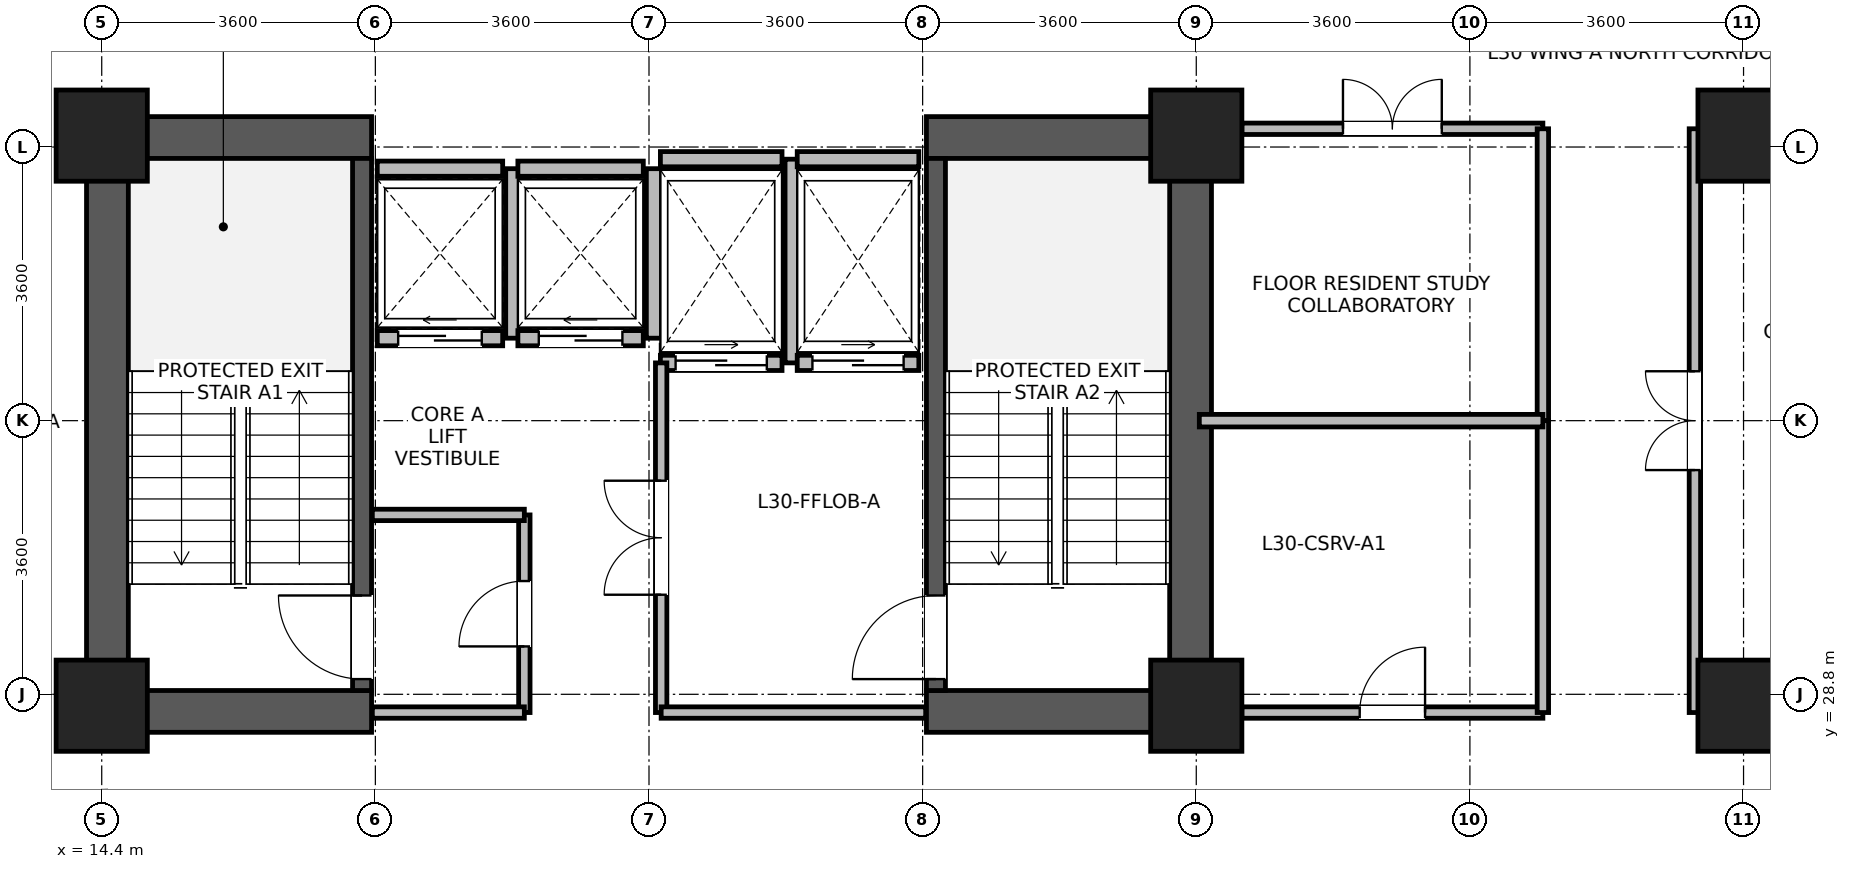
"""IFC4 building model, lengths in metres.
Left out: names, types, materials, properties, quantities, classifications, styles, units other than length and angle.
Written with IfcOpenShell. Run it as: python <this file> out.ifc"""

import sys

from ifc_helpers import new_model, si_unit, direction, frame, frame_2d, origin, origin_2d, place, context, subcontext, project, spatial, rectangle, extrude, source, transform, mapped, element, fill, save


model = new_model("IFC4")
c1 = context("Model", 3, precision=1e-05, world=origin(), true_north=direction((0.0, 1.0)))
c2 = subcontext(c1, "Body", "Model", "MODEL_VIEW")
j1 = project(units=[si_unit("LENGTHUNIT", "METRE"), si_unit("PLANEANGLEUNIT", "RADIAN")], contexts=[c1])
p1 = place(None, origin())
s1 = spatial("IfcSite", under=j1, at=p1, CompositionType="ELEMENT")
p2 = place(p1, origin())
s2 = spatial("IfcBuilding", under=s1, at=p2, CompositionType="ELEMENT")
p3 = place(p2, frame((0.0, 0.0, 119.3)))
s3 = spatial("IfcBuildingStorey", under=s2, at=p3, CompositionType="ELEMENT", Elevation=119.3)
for number, where, z_axis, x_axis in (
    (1, (14.475, 28.3, 0.0), (0.0, 0.0, 1.0), (0.0, 1.0, 0.0)),
    (2, (28.725, 28.3, 0.0), (0.0, 0.0, 1.0), (0.0, 1.0, 0.0)),
):
    element("IfcWall", number, at=place(p3, frame(where, z_axis=z_axis, x_axis=x_axis)), inside=s3, PredefinedType="SHEAR", context=c2, shape_type="SweptSolid", body=[
        extrude(rectangle(XDim=8.1, YDim=0.55, at=frame_2d((4.05, 0.0))), origin(), (0.0, 0.0, 1.0), 3.45),
    ])
for number, where, z_axis, x_axis in (
    (3, (14.75, 28.575, 0.0), (0.0, 0.0, 1.0), (1.0, 0.0, 0.0)),
    (4, (25.25, 28.575, 0.0), (0.0, 0.0, 1.0), (1.0, 0.0, 0.0)),
    (5, (14.75, 36.125, 0.0), (0.0, 0.0, 1.0), (1.0, 0.0, 0.0)),
    (6, (25.25, 36.125, 0.0), (0.0, 0.0, 1.0), (1.0, 0.0, 0.0)),
):
    element("IfcWall", number, at=place(p3, frame(where, z_axis=z_axis, x_axis=x_axis)), inside=s3, PredefinedType="SHEAR", context=c2, shape_type="SweptSolid", body=[
        extrude(rectangle(XDim=3.2, YDim=0.55, at=frame_2d((1.6, 0.0))), origin(), (0.0, 0.0, 1.0), 3.45),
    ])
p4 = place(p3, frame((17.825, 28.85, 0.0), z_axis=(0.0, 0.0, 1.0), x_axis=(0.0, 1.0, 0.0)))
e7 = element("IfcWall", 7, at=p4, inside=s3, PredefinedType="SHEAR", context=c2, shape_type="SweptSolid", body=[
    extrude(rectangle(XDim=7.0, YDim=0.25, at=frame_2d((3.5, 0.0))), origin(), (0.0, 0.0, 1.0), 3.45),
])
p5 = place(p4, frame((0.15, 0.0, 0.0)))
e8 = element("IfcOpeningElement", 8, at=p5, cuts=e7, PredefinedType="OPENING", context=c2, shape_type="SweptSolid", body=[
    extrude(rectangle(XDim=1.1, YDim=2.08, at=frame_2d((0.55, 1.04))), frame((0.0, 0.135, 0.0), z_axis=(0.0, -1.0, 0.0), x_axis=(1.0, 0.0, 0.0)), (0.0, 0.0, 1.0), 0.27),
])
p6 = place(p3, frame((25.375, 28.85, 0.0), z_axis=(0.0, 0.0, 1.0), x_axis=(0.0, 1.0, 0.0)))
e9 = element("IfcWall", 9, at=p6, inside=s3, PredefinedType="SHEAR", context=c2, shape_type="SweptSolid", body=[
    extrude(rectangle(XDim=7.0, YDim=0.25, at=frame_2d((3.5, 0.0))), origin(), (0.0, 0.0, 1.0), 3.45),
])
p7 = place(p6, frame((0.15, 0.0, 0.0)))
e10 = element("IfcOpeningElement", 10, at=p7, cuts=e9, PredefinedType="OPENING", context=c2, shape_type="SweptSolid", body=[
    extrude(rectangle(XDim=1.1, YDim=2.08, at=frame_2d((0.55, 1.04))), frame((0.0, 0.135, 0.0), z_axis=(0.0, -1.0, 0.0), x_axis=(1.0, 0.0, 0.0)), (0.0, 0.0, 1.0), 0.27),
])
m1 = source(origin(), c2, "Body", "SweptSolid", [
    extrude(rectangle(XDim=1.2, YDim=1.2, at=origin_2d()), origin(), (0.0, 0.0, 1.0), 3.7),
])
for number, where, z_axis, x_axis in (
    (11, (14.4, 28.65, 0.0), (0.0, 0.0, 1.0), (1.0, 0.0, 0.0)),
    (12, (14.4, 36.15, 0.0), (0.0, 0.0, 1.0), (1.0, 0.0, 0.0)),
    (13, (28.8, 28.65, 0.0), (0.0, 0.0, 1.0), (1.0, 0.0, 0.0)),
    (14, (28.8, 36.15, 0.0), (0.0, 0.0, 1.0), (1.0, 0.0, 0.0)),
    (15, (36.0, 28.65, 0.0), (0.0, 0.0, 1.0), (1.0, 0.0, 0.0)),
    (16, (36.0, 36.15, 0.0), (0.0, 0.0, 1.0), (1.0, 0.0, 0.0)),
):
    element("IfcColumn", number, at=place(p3, frame(where, z_axis=z_axis, x_axis=x_axis)), inside=s3, PredefinedType="COLUMN", context=c2, shape_type="MappedRepresentation", body=[
        mapped(m1, transform((0.0, 0.0, 0.0), x_axis=(1.0, 0.0, 0.0), y_axis=(0.0, 1.0, 0.0), z_axis=(0.0, 0.0, 1.0), scale=1.0)),
    ])
p8 = place(p3, frame((18.025, 33.485, 0.0), z_axis=(0.0, 0.0, 1.0), x_axis=(1.0, 0.0, 0.0)))
e17 = element("IfcWall", 17, at=p8, inside=s3, PredefinedType="PARTITIONING", context=c2, shape_type="SweptSolid", body=[
    extrude(rectangle(XDim=1.65, YDim=0.2, at=frame_2d((0.825, 0.0))), origin(), (0.0, 0.0, 1.0), 3.43),
])
p9 = place(p8, frame((0.275, 0.0, 0.0)))
e18 = element("IfcOpeningElement", 18, at=p9, cuts=e17, PredefinedType="OPENING", context=c2, shape_type="SweptSolid", body=[
    extrude(rectangle(XDim=1.1, YDim=2.12, at=frame_2d((0.55, 1.06))), frame((0.0, 0.11, 0.0), z_axis=(0.0, -1.0, 0.0), x_axis=(1.0, 0.0, 0.0)), (0.0, 0.0, 1.0), 0.22),
])
p10 = place(p3, frame((18.025, 35.715, 0.0), z_axis=(0.0, 0.0, 1.0), x_axis=(1.0, 0.0, 0.0)))
e19 = element("IfcWall", 19, at=p10, inside=s3, PredefinedType="PARTITIONING", context=c2, shape_type="SweptSolid", body=[
    extrude(rectangle(XDim=1.65, YDim=0.2, at=frame_2d((0.825, 0.0))), origin(), (0.0, 0.0, 1.0), 3.43),
])
p11 = place(p3, frame((19.815, 33.485, 0.0), z_axis=(0.0, 0.0, 1.0), x_axis=(0.0, 1.0, 0.0)))
e20 = element("IfcWall", 20, at=p11, inside=s3, PredefinedType="PARTITIONING", context=c2, shape_type="SweptSolid", body=[
    extrude(rectangle(XDim=2.23, YDim=0.2, at=frame_2d((1.115, 0.0))), origin(), (0.0, 0.0, 1.0), 3.43),
])
p12 = place(p3, frame((19.875, 33.485, 0.0), z_axis=(0.0, 0.0, 1.0), x_axis=(1.0, 0.0, 0.0)))
e21 = element("IfcWall", 21, at=p12, inside=s3, PredefinedType="PARTITIONING", context=c2, shape_type="SweptSolid", body=[
    extrude(rectangle(XDim=1.65, YDim=0.2, at=frame_2d((0.825, 0.0))), origin(), (0.0, 0.0, 1.0), 3.43),
])
p13 = place(p12, frame((0.275, 0.0, 0.0)))
e22 = element("IfcOpeningElement", 22, at=p13, cuts=e21, PredefinedType="OPENING", context=c2, shape_type="SweptSolid", body=[
    extrude(rectangle(XDim=1.1, YDim=2.12, at=frame_2d((0.55, 1.06))), frame((0.0, 0.11, 0.0), z_axis=(0.0, -1.0, 0.0), x_axis=(1.0, 0.0, 0.0)), (0.0, 0.0, 1.0), 0.22),
])
p14 = place(p3, frame((19.875, 35.715, 0.0), z_axis=(0.0, 0.0, 1.0), x_axis=(1.0, 0.0, 0.0)))
e23 = element("IfcWall", 23, at=p14, inside=s3, PredefinedType="PARTITIONING", context=c2, shape_type="SweptSolid", body=[
    extrude(rectangle(XDim=1.65, YDim=0.2, at=frame_2d((0.825, 0.0))), origin(), (0.0, 0.0, 1.0), 3.43),
])
p15 = place(p3, frame((21.665, 33.485, 0.0), z_axis=(0.0, 0.0, 1.0), x_axis=(0.0, 1.0, 0.0)))
e24 = element("IfcWall", 24, at=p15, inside=s3, PredefinedType="PARTITIONING", context=c2, shape_type="SweptSolid", body=[
    extrude(rectangle(XDim=2.23, YDim=0.2, at=frame_2d((1.115, 0.0))), origin(), (0.0, 0.0, 1.0), 3.43),
])
p16 = place(p3, frame((21.75, 33.16, 0.0), z_axis=(0.0, 0.0, 1.0), x_axis=(1.0, 0.0, 0.0)))
e25 = element("IfcWall", 25, at=p16, inside=s3, PredefinedType="PARTITIONING", context=c2, shape_type="SweptSolid", body=[
    extrude(rectangle(XDim=1.6, YDim=0.2, at=frame_2d((0.8, 0.0))), origin(), (0.0, 0.0, 1.0), 3.43),
])
p17 = place(p16, frame((0.2, 0.0, 0.0)))
e26 = element("IfcOpeningElement", 26, at=p17, cuts=e25, PredefinedType="OPENING", context=c2, shape_type="SweptSolid", body=[
    extrude(rectangle(XDim=1.2, YDim=2.12, at=frame_2d((0.6, 1.06))), frame((0.0, 0.11, 0.0), z_axis=(0.0, -1.0, 0.0), x_axis=(1.0, 0.0, 0.0)), (0.0, 0.0, 1.0), 0.22),
])
p18 = place(p3, frame((21.75, 35.84, 0.0), z_axis=(0.0, 0.0, 1.0), x_axis=(1.0, 0.0, 0.0)))
e27 = element("IfcWall", 27, at=p18, inside=s3, PredefinedType="PARTITIONING", context=c2, shape_type="SweptSolid", body=[
    extrude(rectangle(XDim=1.6, YDim=0.2, at=frame_2d((0.8, 0.0))), origin(), (0.0, 0.0, 1.0), 2.43),
])
p19 = place(p3, frame((23.49, 33.16, 0.0), z_axis=(0.0, 0.0, 1.0), x_axis=(0.0, 1.0, 0.0)))
e28 = element("IfcWall", 28, at=p19, inside=s3, PredefinedType="PARTITIONING", context=c2, shape_type="SweptSolid", body=[
    extrude(rectangle(XDim=2.68, YDim=0.2, at=frame_2d((1.34, 0.0))), origin(), (0.0, 0.0, 1.0), 3.43),
])
p20 = place(p3, frame((23.55, 33.16, 0.0), z_axis=(0.0, 0.0, 1.0), x_axis=(1.0, 0.0, 0.0)))
e29 = element("IfcWall", 29, at=p20, inside=s3, PredefinedType="PARTITIONING", context=c2, shape_type="SweptSolid", body=[
    extrude(rectangle(XDim=1.6, YDim=0.2, at=frame_2d((0.8, 0.0))), origin(), (0.0, 0.0, 1.0), 3.43),
])
p21 = place(p20, frame((0.2, 0.0, 0.0)))
e30 = element("IfcOpeningElement", 30, at=p21, cuts=e29, PredefinedType="OPENING", context=c2, shape_type="SweptSolid", body=[
    extrude(rectangle(XDim=1.2, YDim=2.12, at=frame_2d((0.6, 1.06))), frame((0.0, 0.11, 0.0), z_axis=(0.0, -1.0, 0.0), x_axis=(1.0, 0.0, 0.0)), (0.0, 0.0, 1.0), 0.22),
])
p22 = place(p3, frame((23.55, 35.84, 0.0), z_axis=(0.0, 0.0, 1.0), x_axis=(1.0, 0.0, 0.0)))
e31 = element("IfcWall", 31, at=p22, inside=s3, PredefinedType="PARTITIONING", context=c2, shape_type="SweptSolid", body=[
    extrude(rectangle(XDim=1.6, YDim=0.2, at=frame_2d((0.8, 0.0))), origin(), (0.0, 0.0, 1.0), 2.43),
])
p23 = place(p3, frame((35.36, 28.56, 0.0), z_axis=(0.0, 0.0, 1.0), x_axis=(0.0, 1.0, 0.0)))
e32 = element("IfcWall", 32, at=p23, inside=s3, PredefinedType="PARTITIONING", context=c2, shape_type="SweptSolid", body=[
    extrude(rectangle(XDim=7.68, YDim=0.15, at=frame_2d((3.84, 0.0))), origin(), (0.0, 0.0, 1.0), 3.43),
])
p24 = place(p23, frame((3.19, 0.0, 0.0)))
e33 = element("IfcOpeningElement", 33, at=p24, cuts=e32, PredefinedType="OPENING", context=c2, shape_type="SweptSolid", body=[
    extrude(rectangle(XDim=1.3, YDim=2.12, at=frame_2d((0.65, 1.06))), frame((0.0, 0.085, 0.0), z_axis=(0.0, -1.0, 0.0), x_axis=(1.0, 0.0, 0.0)), (0.0, 0.0, 1.0), 0.17),
])
p25 = place(p3, frame((29.4, 28.56, 0.0), z_axis=(0.0, 0.0, 1.0), x_axis=(1.0, 0.0, 0.0)))
e34 = element("IfcWall", 34, at=p25, inside=s3, PredefinedType="PARTITIONING", context=c2, shape_type="SweptSolid", body=[
    extrude(rectangle(XDim=3.96, YDim=0.15, at=frame_2d((1.98, 0.0))), origin(), (0.0, 0.0, 1.0), 2.78),
])
p26 = place(p25, frame((1.55, 0.0, 0.0)))
e35 = element("IfcOpeningElement", 35, at=p26, cuts=e34, PredefinedType="OPENING", context=c2, shape_type="SweptSolid", body=[
    extrude(rectangle(XDim=0.86, YDim=2.02, at=frame_2d((0.43, 1.01))), frame((0.0, 0.085, 0.0), z_axis=(0.0, -1.0, 0.0), x_axis=(1.0, 0.0, 0.0)), (0.0, 0.0, 1.0), 0.17),
])
p27 = place(p3, frame((29.4, 36.24, 0.0), z_axis=(0.0, 0.0, 1.0), x_axis=(1.0, 0.0, 0.0)))
e36 = element("IfcWall", 36, at=p27, inside=s3, PredefinedType="PARTITIONING", context=c2, shape_type="SweptSolid", body=[
    extrude(rectangle(XDim=3.96, YDim=0.15, at=frame_2d((1.98, 0.0))), origin(), (0.0, 0.0, 1.0), 2.78),
])
p28 = place(p27, frame((1.33, 0.0, 0.0)))
e37 = element("IfcOpeningElement", 37, at=p28, cuts=e36, PredefinedType="OPENING", context=c2, shape_type="SweptSolid", body=[
    extrude(rectangle(XDim=1.3, YDim=2.12, at=frame_2d((0.65, 1.06))), frame((0.0, 0.085, 0.0), z_axis=(0.0, -1.0, 0.0), x_axis=(1.0, 0.0, 0.0)), (0.0, 0.0, 1.0), 0.17),
])
p29 = place(p3, frame((33.36, 32.4, 0.0), z_axis=(0.0, 0.0, 1.0), x_axis=(0.0, 1.0, 0.0)))
e38 = element("IfcWall", 38, at=p29, inside=s3, PredefinedType="PARTITIONING", context=c2, shape_type="SweptSolid", body=[
    extrude(rectangle(XDim=3.84, YDim=0.15, at=frame_2d((1.92, 0.0))), origin(), (0.0, 0.0, 1.0), 3.43),
])
p30 = place(p3, frame((33.36, 28.56, 0.0), z_axis=(0.0, 0.0, 1.0), x_axis=(0.0, 1.0, 0.0)))
e39 = element("IfcWall", 39, at=p30, inside=s3, PredefinedType="PARTITIONING", context=c2, shape_type="SweptSolid", body=[
    extrude(rectangle(XDim=3.84, YDim=0.15, at=frame_2d((1.92, 0.0))), origin(), (0.0, 0.0, 1.0), 3.43),
])
p31 = place(p3, frame((19.96, 28.56, 0.0), z_axis=(0.0, 0.0, 1.0), x_axis=(0.0, 1.0, 0.0)))
e40 = element("IfcWall", 40, at=p31, inside=s3, PredefinedType="PARTITIONING", context=c2, shape_type="SweptSolid", body=[
    extrude(rectangle(XDim=2.6, YDim=0.15, at=frame_2d((1.3, 0.0))), origin(), (0.0, 0.0, 1.0), 3.43),
])
p32 = place(p31, frame((0.87, 0.0, 0.0)))
e41 = element("IfcOpeningElement", 41, at=p32, cuts=e40, PredefinedType="OPENING", context=c2, shape_type="SweptSolid", body=[
    extrude(rectangle(XDim=0.86, YDim=2.02, at=frame_2d((0.43, 1.01))), frame((0.0, 0.085, 0.0), z_axis=(0.0, -1.0, 0.0), x_axis=(1.0, 0.0, 0.0)), (0.0, 0.0, 1.0), 0.17),
])
p33 = place(p3, frame((17.96, 28.56, 0.0), z_axis=(0.0, 0.0, 1.0), x_axis=(1.0, 0.0, 0.0)))
e42 = element("IfcWall", 42, at=p33, inside=s3, PredefinedType="PARTITIONING", context=c2, shape_type="SweptSolid", body=[
    extrude(rectangle(XDim=2.0, YDim=0.15, at=frame_2d((1.0, 0.0))), origin(), (0.0, 0.0, 1.0), 2.43),
])
p34 = place(p3, frame((17.96, 31.16, 0.0), z_axis=(0.0, 0.0, 1.0), x_axis=(1.0, 0.0, 0.0)))
e43 = element("IfcWall", 43, at=p34, inside=s3, PredefinedType="PARTITIONING", context=c2, shape_type="SweptSolid", body=[
    extrude(rectangle(XDim=2.0, YDim=0.15, at=frame_2d((1.0, 0.0))), origin(), (0.0, 0.0, 1.0), 3.43),
])
p35 = place(p3, frame((21.76, 28.56, 0.0), z_axis=(0.0, 0.0, 1.0), x_axis=(0.0, 1.0, 0.0)))
e44 = element("IfcWall", 44, at=p35, inside=s3, PredefinedType="PARTITIONING", context=c2, shape_type="SweptSolid", body=[
    extrude(rectangle(XDim=4.6, YDim=0.15, at=frame_2d((2.3, 0.0))), origin(), (0.0, 0.0, 1.0), 3.43),
])
p36 = place(p35, frame((1.55, 0.0, 0.0)))
e45 = element("IfcOpeningElement", 45, at=p36, cuts=e44, PredefinedType="OPENING", context=c2, shape_type="SweptSolid", body=[
    extrude(rectangle(XDim=1.5, YDim=2.1, at=frame_2d((0.75, 1.05))), frame((0.0, 0.085, 0.0), z_axis=(0.0, -1.0, 0.0), x_axis=(1.0, 0.0, 0.0)), (0.0, 0.0, 1.0), 0.17),
])
p37 = place(p3, frame((28.84, 32.4, 0.0), z_axis=(0.0, 0.0, 1.0), x_axis=(1.0, 0.0, 0.0)))
e46 = element("IfcWall", 46, at=p37, inside=s3, PredefinedType="PARTITIONING", context=c2, shape_type="SweptSolid", body=[
    extrude(rectangle(XDim=4.52, YDim=0.165, at=frame_2d((2.26, 0.0))), origin(), (0.0, 0.0, 1.0), 3.43),
])
p38 = place(p3, frame((21.76, 28.56, 0.0), z_axis=(0.0, 0.0, 1.0), x_axis=(1.0, 0.0, 0.0)))
e47 = element("IfcWall", 47, at=p38, inside=s3, PredefinedType="PARTITIONING", context=c2, shape_type="SweptSolid", body=[
    extrude(rectangle(XDim=3.48, YDim=0.15, at=frame_2d((1.74, 0.0))), origin(), (0.0, 0.0, 1.0), 2.43),
])
p39 = place(p5, origin())
e48 = element("IfcDoor", 48, at=p39, inside=s3, OperationType="SINGLE_SWING_RIGHT", PredefinedType="DOOR", context=c2, shape_type="SweptSolid", body=[
    extrude(rectangle(XDim=1.1, YDim=2.08, at=frame_2d((0.55, 1.04))), frame((0.0, 0.025, 0.0), z_axis=(0.0, -1.0, 0.0), x_axis=(1.0, 0.0, 0.0)), (0.0, 0.0, 1.0), 0.05),
])
fill(e8, e48)
p40 = place(p7, origin())
e49 = element("IfcDoor", 49, at=p40, inside=s3, OperationType="SINGLE_SWING_LEFT", PredefinedType="DOOR", context=c2, shape_type="SweptSolid", body=[
    extrude(rectangle(XDim=1.1, YDim=2.08, at=frame_2d((0.55, 1.04))), frame((0.0, 0.025, 0.0), z_axis=(0.0, -1.0, 0.0), x_axis=(1.0, 0.0, 0.0)), (0.0, 0.0, 1.0), 0.05),
])
fill(e10, e49)
p41 = place(p9, origin())
e50 = element("IfcDoor", 50, at=p41, inside=s3, OperationType="SLIDING_TO_LEFT", PredefinedType="DOOR", context=c2, shape_type="SweptSolid", body=[
    extrude(rectangle(XDim=1.1, YDim=2.12, at=frame_2d((0.55, 1.06))), frame((0.0, 0.025, 0.0), z_axis=(0.0, -1.0, 0.0), x_axis=(1.0, 0.0, 0.0)), (0.0, 0.0, 1.0), 0.05),
])
fill(e18, e50)
p42 = place(p13, origin())
e51 = element("IfcDoor", 51, at=p42, inside=s3, OperationType="SLIDING_TO_LEFT", PredefinedType="DOOR", context=c2, shape_type="SweptSolid", body=[
    extrude(rectangle(XDim=1.1, YDim=2.12, at=frame_2d((0.55, 1.06))), frame((0.0, 0.025, 0.0), z_axis=(0.0, -1.0, 0.0), x_axis=(1.0, 0.0, 0.0)), (0.0, 0.0, 1.0), 0.05),
])
fill(e22, e51)
p43 = place(p17, origin())
e52 = element("IfcDoor", 52, at=p43, inside=s3, OperationType="SLIDING_TO_RIGHT", PredefinedType="DOOR", context=c2, shape_type="SweptSolid", body=[
    extrude(rectangle(XDim=1.2, YDim=2.12, at=frame_2d((0.6, 1.06))), frame((0.0, 0.025, 0.0), z_axis=(0.0, -1.0, 0.0), x_axis=(1.0, 0.0, 0.0)), (0.0, 0.0, 1.0), 0.05),
])
fill(e26, e52)
p44 = place(p21, origin())
e53 = element("IfcDoor", 53, at=p44, inside=s3, OperationType="SLIDING_TO_RIGHT", PredefinedType="DOOR", context=c2, shape_type="SweptSolid", body=[
    extrude(rectangle(XDim=1.2, YDim=2.12, at=frame_2d((0.6, 1.06))), frame((0.0, 0.025, 0.0), z_axis=(0.0, -1.0, 0.0), x_axis=(1.0, 0.0, 0.0)), (0.0, 0.0, 1.0), 0.05),
])
fill(e30, e53)
p45 = place(p24, origin())
e54 = element("IfcDoor", 54, at=p45, inside=s3, OperationType="DOUBLE_DOOR_SINGLE_SWING", PredefinedType="DOOR", context=c2, shape_type="SweptSolid", body=[
    extrude(rectangle(XDim=1.3, YDim=2.12, at=frame_2d((0.65, 1.06))), frame((0.0, 0.025, 0.0), z_axis=(0.0, -1.0, 0.0), x_axis=(1.0, 0.0, 0.0)), (0.0, 0.0, 1.0), 0.05),
])
fill(e33, e54)
p46 = place(p26, origin())
e55 = element("IfcDoor", 55, at=p46, inside=s3, OperationType="SINGLE_SWING_RIGHT", PredefinedType="DOOR", context=c2, shape_type="SweptSolid", body=[
    extrude(rectangle(XDim=0.86, YDim=2.02, at=frame_2d((0.43, 1.01))), frame((0.0, 0.025, 0.0), z_axis=(0.0, -1.0, 0.0), x_axis=(1.0, 0.0, 0.0)), (0.0, 0.0, 1.0), 0.05),
])
fill(e35, e55)
p47 = place(p28, origin())
e56 = element("IfcDoor", 56, at=p47, inside=s3, OperationType="DOUBLE_DOOR_SINGLE_SWING", PredefinedType="DOOR", context=c2, shape_type="SweptSolid", body=[
    extrude(rectangle(XDim=1.3, YDim=2.12, at=frame_2d((0.65, 1.06))), frame((0.0, 0.025, 0.0), z_axis=(0.0, -1.0, 0.0), x_axis=(1.0, 0.0, 0.0)), (0.0, 0.0, 1.0), 0.05),
])
fill(e37, e56)
p48 = place(p32, origin())
e57 = element("IfcDoor", 57, at=p48, inside=s3, OperationType="SINGLE_SWING_LEFT", PredefinedType="DOOR", context=c2, shape_type="SweptSolid", body=[
    extrude(rectangle(XDim=0.86, YDim=2.02, at=frame_2d((0.43, 1.01))), frame((0.0, 0.025, 0.0), z_axis=(0.0, -1.0, 0.0), x_axis=(1.0, 0.0, 0.0)), (0.0, 0.0, 1.0), 0.05),
])
fill(e41, e57)
p49 = place(p36, origin())
e58 = element("IfcDoor", 58, at=p49, inside=s3, OperationType="DOUBLE_DOOR_SINGLE_SWING", PredefinedType="DOOR", context=c2, shape_type="SweptSolid", body=[
    extrude(rectangle(XDim=1.5, YDim=2.1, at=frame_2d((0.75, 1.05))), frame((0.0, 0.025, 0.0), z_axis=(0.0, -1.0, 0.0), x_axis=(1.0, 0.0, 0.0)), (0.0, 0.0, 1.0), 0.05),
])
fill(e45, e58)
save(model, sys.argv[1])
